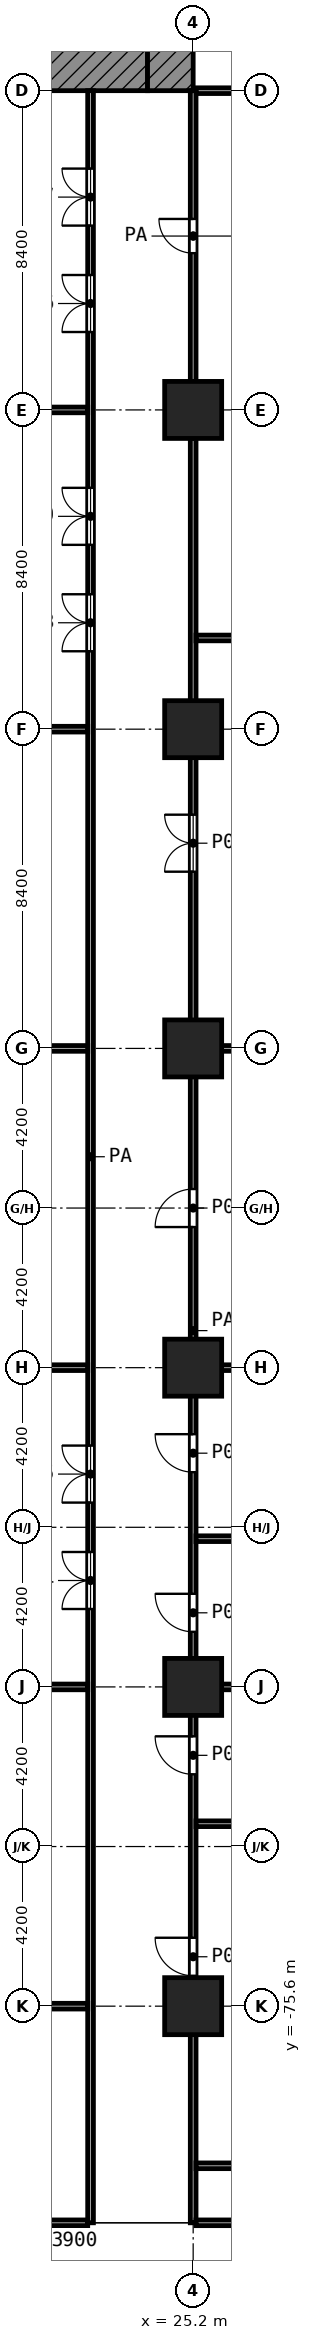
"""IFC4 building model, lengths in metres.
Left out: names, types, materials, properties, quantities, classifications, styles, units other than length and angle.
Written with IfcOpenShell. Run it as: python <this file> out.ifc"""

import sys

from ifc_helpers import new_model, si_unit, direction, frame, frame_2d, origin, origin_2d, place, context, subcontext, project, spatial, rectangle, extrude, element, fill, save


model = new_model("IFC4")
c1 = context("Model", 3, precision=1e-05, world=origin(), true_north=direction((0.0, 1.0)))
c2 = subcontext(c1, "Body", "Model", "MODEL_VIEW")
j1 = project(units=[si_unit("LENGTHUNIT", "METRE"), si_unit("PLANEANGLEUNIT", "RADIAN")], contexts=[c1])
p1 = place(None, origin())
s1 = spatial("IfcSite", under=j1, at=p1, CompositionType="ELEMENT")
p2 = place(p1, origin())
s2 = spatial("IfcBuilding", under=s1, at=p2, CompositionType="ELEMENT")
p3 = place(p2, frame((0.0, 0.0, 7.0)))
s3 = spatial("IfcBuildingStorey", under=s2, at=p3, CompositionType="ELEMENT", Elevation=7.0)
for number, where, z_axis, x_axis in (
    (1, (25.2, -33.6, 0.0), (0.0, 0.0, 1.0), (1.0, 0.0, 0.0)),
    (2, (25.2, -42.0, 0.0), (0.0, 0.0, 1.0), (1.0, 0.0, 0.0)),
    (3, (25.2, -50.4, 0.0), (0.0, 0.0, 1.0), (1.0, 0.0, 0.0)),
    (4, (25.2, -58.8, 0.0), (0.0, 0.0, 1.0), (1.0, 0.0, 0.0)),
    (5, (25.2, -67.2, 0.0), (0.0, 0.0, 1.0), (1.0, 0.0, 0.0)),
    (6, (25.2, -75.6, 0.0), (0.0, 0.0, 1.0), (1.0, 0.0, 0.0)),
):
    element("IfcColumn", number, at=place(p3, frame(where, z_axis=z_axis, x_axis=x_axis)), inside=s3, PredefinedType="COLUMN", context=c2, shape_type="SweptSolid", body=[
        extrude(rectangle(XDim=1.5, YDim=1.5, at=origin_2d()), origin(), (0.0, 0.0, 1.0), 5.6),
    ])
p4 = place(p3, frame((5.4, -24.6, 0.0), z_axis=(0.0, 0.0, 1.0), x_axis=(1.0, 0.0, 0.0)))
e7 = element("IfcWall", 7, at=p4, inside=s3, PredefinedType="SHEAR", context=c2, shape_type="SweptSolid", body=[
    extrude(rectangle(XDim=18.6, YDim=1.2, at=frame_2d((9.3, 0.0))), origin(), (0.0, 0.0, 1.0), 5.25),
])
p5 = place(p4, frame((6.3, 0.0, 0.0)))
e8 = element("IfcOpeningElement", 8, at=p5, cuts=e7, PredefinedType="OPENING", context=c2, shape_type="SweptSolid", body=[
    extrude(rectangle(XDim=1.8, YDim=2.1, at=frame_2d((0.9, 1.05))), frame((0.0, 0.61, 0.0), z_axis=(0.0, -1.0, 0.0), x_axis=(1.0, 0.0, 0.0)), (0.0, 0.0, 1.0), 1.22),
])
p6 = place(p3, frame((24.6, -25.2, 0.0), z_axis=(0.0, 0.0, 1.0), x_axis=(0.0, 1.0, 0.0)))
e9 = element("IfcWall", 9, at=p6, inside=s3, PredefinedType="SHEAR", context=c2, shape_type="SweptSolid", body=[
    extrude(rectangle(XDim=1.2, YDim=1.2, at=frame_2d((0.6, 0.0))), origin(), (0.0, 0.0, 1.0), 5.25),
])
p7 = place(p3, frame((11.175, -81.3, 0.0), z_axis=(0.0, 0.0, 1.0), x_axis=(1.0, 0.0, 0.0)))
e10 = element("IfcWall", 10, at=p7, inside=s3, PredefinedType="PARTITIONING", context=c2, shape_type="SweptSolid", body=[
    extrude(rectangle(XDim=11.25, YDim=0.15, at=frame_2d((5.625, 0.0))), origin(), (0.0, 0.0, 1.0), 5.25),
])
p8 = place(p7, frame((5.125, 0.0, 0.0)))
e11 = element("IfcOpeningElement", 11, at=p8, cuts=e10, PredefinedType="OPENING", context=c2, shape_type="SweptSolid", body=[
    extrude(rectangle(XDim=1.0, YDim=2.1, at=frame_2d((0.5, 1.05))), frame((0.0, 0.085, 0.0), z_axis=(0.0, -1.0, 0.0), x_axis=(1.0, 0.0, 0.0)), (0.0, 0.0, 1.0), 0.17),
])
p9 = place(p3, frame((25.275, -81.3, 0.0), z_axis=(0.0, 0.0, 1.0), x_axis=(1.0, 0.0, 0.0)))
e12 = element("IfcWall", 12, at=p9, inside=s3, PredefinedType="PARTITIONING", context=c2, shape_type="SweptSolid", body=[
    extrude(rectangle(XDim=3.15, YDim=0.15, at=frame_2d((1.575, 0.0))), origin(), (0.0, 0.0, 1.0), 5.25),
])
p10 = place(p3, frame((25.275, -79.8, 0.0), z_axis=(0.0, 0.0, 1.0), x_axis=(1.0, 0.0, 0.0)))
e13 = element("IfcWall", 13, at=p10, inside=s3, PredefinedType="PARTITIONING", context=c2, shape_type="SweptSolid", body=[
    extrude(rectangle(XDim=7.612, YDim=0.15, at=frame_2d((3.806, 0.0))), origin(), (0.0, 0.0, 1.0), 3.85),
])
p11 = place(p3, frame((11.175, -75.6, 0.0), z_axis=(0.0, 0.0, 1.0), x_axis=(1.0, 0.0, 0.0)))
e14 = element("IfcWall", 14, at=p11, inside=s3, PredefinedType="PARTITIONING", context=c2, shape_type="SweptSolid", body=[
    extrude(rectangle(XDim=11.25, YDim=0.15, at=frame_2d((5.625, 0.0))), origin(), (0.0, 0.0, 1.0), 5.25),
])
p12 = place(p3, frame((25.275, -70.8, 0.0), z_axis=(0.0, 0.0, 1.0), x_axis=(1.0, 0.0, 0.0)))
e15 = element("IfcWall", 15, at=p12, inside=s3, PredefinedType="PARTITIONING", context=c2, shape_type="SweptSolid", body=[
    extrude(rectangle(XDim=8.805, YDim=0.15, at=frame_2d((4.403, 0.0))), origin(), (0.0, 0.0, 1.0), 3.85),
])
p13 = place(p3, frame((11.175, -67.2, 0.0), z_axis=(0.0, 0.0, 1.0), x_axis=(1.0, 0.0, 0.0)))
e16 = element("IfcWall", 16, at=p13, inside=s3, PredefinedType="PARTITIONING", context=c2, shape_type="SweptSolid", body=[
    extrude(rectangle(XDim=11.25, YDim=0.15, at=frame_2d((5.625, 0.0))), origin(), (0.0, 0.0, 1.0), 5.25),
])
p14 = place(p3, frame((25.275, -67.2, 0.0), z_axis=(0.0, 0.0, 1.0), x_axis=(1.0, 0.0, 0.0)))
e17 = element("IfcWall", 17, at=p14, inside=s3, PredefinedType="PARTITIONING", context=c2, shape_type="SweptSolid", body=[
    extrude(rectangle(XDim=8.805, YDim=0.15, at=frame_2d((4.403, 0.0))), origin(), (0.0, 0.0, 1.0), 4.35),
])
p15 = place(p3, frame((25.275, -63.3, 0.0), z_axis=(0.0, 0.0, 1.0), x_axis=(1.0, 0.0, 0.0)))
e18 = element("IfcWall", 18, at=p15, inside=s3, PredefinedType="PARTITIONING", context=c2, shape_type="SweptSolid", body=[
    extrude(rectangle(XDim=8.805, YDim=0.15, at=frame_2d((4.403, 0.0))), origin(), (0.0, 0.0, 1.0), 3.85),
])
p16 = place(p3, frame((11.175, -58.8, 0.0), z_axis=(0.0, 0.0, 1.0), x_axis=(1.0, 0.0, 0.0)))
e19 = element("IfcWall", 19, at=p16, inside=s3, PredefinedType="PARTITIONING", context=c2, shape_type="SweptSolid", body=[
    extrude(rectangle(XDim=11.25, YDim=0.15, at=frame_2d((5.625, 0.0))), origin(), (0.0, 0.0, 1.0), 5.25),
])
p17 = place(p3, frame((25.275, -58.8, 0.0), z_axis=(0.0, 0.0, 1.0), x_axis=(1.0, 0.0, 0.0)))
e20 = element("IfcWall", 20, at=p17, inside=s3, PredefinedType="PARTITIONING", context=c2, shape_type="SweptSolid", body=[
    extrude(rectangle(XDim=8.805, YDim=0.15, at=frame_2d((4.403, 0.0))), origin(), (0.0, 0.0, 1.0), 4.35),
])
p18 = place(p3, frame((11.175, -50.4, 0.0), z_axis=(0.0, 0.0, 1.0), x_axis=(1.0, 0.0, 0.0)))
e21 = element("IfcWall", 21, at=p18, inside=s3, PredefinedType="PARTITIONING", context=c2, shape_type="SweptSolid", body=[
    extrude(rectangle(XDim=11.25, YDim=0.15, at=frame_2d((5.625, 0.0))), origin(), (0.0, 0.0, 1.0), 5.25),
])
p19 = place(p3, frame((25.275, -50.4, 0.0), z_axis=(0.0, 0.0, 1.0), x_axis=(1.0, 0.0, 0.0)))
e22 = element("IfcWall", 22, at=p19, inside=s3, PredefinedType="PARTITIONING", context=c2, shape_type="SweptSolid", body=[
    extrude(rectangle(XDim=8.805, YDim=0.15, at=frame_2d((4.403, 0.0))), origin(), (0.0, 0.0, 1.0), 4.35),
])
p20 = place(p3, frame((11.175, -42.0, 0.0), z_axis=(0.0, 0.0, 1.0), x_axis=(1.0, 0.0, 0.0)))
e23 = element("IfcWall", 23, at=p20, inside=s3, PredefinedType="PARTITIONING", context=c2, shape_type="SweptSolid", body=[
    extrude(rectangle(XDim=11.25, YDim=0.15, at=frame_2d((5.625, 0.0))), origin(), (0.0, 0.0, 1.0), 5.25),
])
p21 = place(p3, frame((25.275, -39.6, 0.0), z_axis=(0.0, 0.0, 1.0), x_axis=(1.0, 0.0, 0.0)))
e24 = element("IfcWall", 24, at=p21, inside=s3, PredefinedType="PARTITIONING", context=c2, shape_type="SweptSolid", body=[
    extrude(rectangle(XDim=9.412, YDim=0.15, at=frame_2d((4.706, 0.0))), origin(), (0.0, 0.0, 1.0), 5.25),
])
p22 = place(p3, frame((11.175, -33.6, 0.0), z_axis=(0.0, 0.0, 1.0), x_axis=(1.0, 0.0, 0.0)))
e25 = element("IfcWall", 25, at=p22, inside=s3, PredefinedType="PARTITIONING", context=c2, shape_type="SweptSolid", body=[
    extrude(rectangle(XDim=11.25, YDim=0.15, at=frame_2d((5.625, 0.0))), origin(), (0.0, 0.0, 1.0), 5.25),
])
p23 = place(p3, frame((25.275, -25.2, 0.0), z_axis=(0.0, 0.0, 1.0), x_axis=(1.0, 0.0, 0.0)))
e26 = element("IfcWall", 26, at=p23, inside=s3, PredefinedType="PARTITIONING", context=c2, shape_type="SweptSolid", body=[
    extrude(rectangle(XDim=32.325, YDim=0.15, at=frame_2d((16.163, 0.0))), origin(), (0.0, 0.0, 1.0), 5.25),
])
p24 = place(p23, frame((18.625, 0.0, 0.0)))
e27 = element("IfcOpeningElement", 27, at=p24, cuts=e26, PredefinedType="OPENING", context=c2, shape_type="SweptSolid", body=[
    extrude(rectangle(XDim=1.0, YDim=2.1, at=frame_2d((0.5, 1.05))), frame((0.0, 0.085, 0.0), z_axis=(0.0, -1.0, 0.0), x_axis=(1.0, 0.0, 0.0)), (0.0, 0.0, 1.0), 0.17),
])
p25 = place(p23, frame((22.825, 0.0, 0.0)))
e28 = element("IfcOpeningElement", 28, at=p25, cuts=e26, PredefinedType="OPENING", context=c2, shape_type="SweptSolid", body=[
    extrude(rectangle(XDim=1.0, YDim=2.1, at=frame_2d((0.5, 1.05))), frame((0.0, 0.085, 0.0), z_axis=(0.0, -1.0, 0.0), x_axis=(1.0, 0.0, 0.0)), (0.0, 0.0, 1.0), 0.17),
])
p26 = place(p23, frame((26.575, 0.0, 0.0)))
e29 = element("IfcOpeningElement", 29, at=p26, cuts=e26, PredefinedType="OPENING", context=c2, shape_type="SweptSolid", body=[
    extrude(rectangle(XDim=1.0, YDim=2.1, at=frame_2d((0.5, 1.05))), frame((0.0, 0.085, 0.0), z_axis=(0.0, -1.0, 0.0), x_axis=(1.0, 0.0, 0.0)), (0.0, 0.0, 1.0), 0.17),
])
p27 = place(p23, frame((30.175, 0.0, 0.0)))
e30 = element("IfcOpeningElement", 30, at=p27, cuts=e26, PredefinedType="OPENING", context=c2, shape_type="SweptSolid", body=[
    extrude(rectangle(XDim=1.0, YDim=2.1, at=frame_2d((0.5, 1.05))), frame((0.0, 0.085, 0.0), z_axis=(0.0, -1.0, 0.0), x_axis=(1.0, 0.0, 0.0)), (0.0, 0.0, 1.0), 0.17),
])
p28 = place(p23, frame((9.125, 0.0, 0.0)))
e31 = element("IfcOpeningElement", 31, at=p28, cuts=e26, PredefinedType="OPENING", context=c2, shape_type="SweptSolid", body=[
    extrude(rectangle(XDim=1.5, YDim=2.1, at=frame_2d((0.75, 1.05))), frame((0.0, 0.085, 0.0), z_axis=(0.0, -1.0, 0.0), x_axis=(1.0, 0.0, 0.0)), (0.0, 0.0, 1.0), 0.17),
])
p29 = place(p3, frame((22.5, -81.3, 0.0), z_axis=(0.0, 0.0, 1.0), x_axis=(0.0, 1.0, 0.0)))
e32 = element("IfcWall", 32, at=p29, inside=s3, PredefinedType="PARTITIONING", context=c2, shape_type="SweptSolid", body=[
    extrude(rectangle(XDim=56.1, YDim=0.15, at=frame_2d((28.05, 0.0))), origin(), (0.0, 0.0, 1.0), 5.25),
])
p30 = place(p29, frame((49.75, 0.0, 0.0)))
e33 = element("IfcOpeningElement", 33, at=p30, cuts=e32, PredefinedType="OPENING", context=c2, shape_type="SweptSolid", body=[
    extrude(rectangle(XDim=1.5, YDim=2.1, at=frame_2d((0.75, 1.05))), frame((0.0, 0.085, 0.0), z_axis=(0.0, -1.0, 0.0), x_axis=(1.0, 0.0, 0.0)), (0.0, 0.0, 1.0), 0.17),
])
p31 = place(p29, frame((52.55, 0.0, 0.0)))
e34 = element("IfcOpeningElement", 34, at=p31, cuts=e32, PredefinedType="OPENING", context=c2, shape_type="SweptSolid", body=[
    extrude(rectangle(XDim=1.5, YDim=2.1, at=frame_2d((0.75, 1.05))), frame((0.0, 0.085, 0.0), z_axis=(0.0, -1.0, 0.0), x_axis=(1.0, 0.0, 0.0)), (0.0, 0.0, 1.0), 0.17),
])
p32 = place(p29, frame((41.35, 0.0, 0.0)))
e35 = element("IfcOpeningElement", 35, at=p32, cuts=e32, PredefinedType="OPENING", context=c2, shape_type="SweptSolid", body=[
    extrude(rectangle(XDim=1.5, YDim=2.1, at=frame_2d((0.75, 1.05))), frame((0.0, 0.085, 0.0), z_axis=(0.0, -1.0, 0.0), x_axis=(1.0, 0.0, 0.0)), (0.0, 0.0, 1.0), 0.17),
])
p33 = place(p29, frame((44.15, 0.0, 0.0)))
e36 = element("IfcOpeningElement", 36, at=p33, cuts=e32, PredefinedType="OPENING", context=c2, shape_type="SweptSolid", body=[
    extrude(rectangle(XDim=1.5, YDim=2.1, at=frame_2d((0.75, 1.05))), frame((0.0, 0.085, 0.0), z_axis=(0.0, -1.0, 0.0), x_axis=(1.0, 0.0, 0.0)), (0.0, 0.0, 1.0), 0.17),
])
p34 = place(p29, frame((16.15, 0.0, 0.0)))
e37 = element("IfcOpeningElement", 37, at=p34, cuts=e32, PredefinedType="OPENING", context=c2, shape_type="SweptSolid", body=[
    extrude(rectangle(XDim=1.5, YDim=2.1, at=frame_2d((0.75, 1.05))), frame((0.0, 0.085, 0.0), z_axis=(0.0, -1.0, 0.0), x_axis=(1.0, 0.0, 0.0)), (0.0, 0.0, 1.0), 0.17),
])
p35 = place(p29, frame((18.95, 0.0, 0.0)))
e38 = element("IfcOpeningElement", 38, at=p35, cuts=e32, PredefinedType="OPENING", context=c2, shape_type="SweptSolid", body=[
    extrude(rectangle(XDim=1.5, YDim=2.1, at=frame_2d((0.75, 1.05))), frame((0.0, 0.085, 0.0), z_axis=(0.0, -1.0, 0.0), x_axis=(1.0, 0.0, 0.0)), (0.0, 0.0, 1.0), 0.17),
])
p36 = place(p3, frame((25.2, -81.3, 0.0), z_axis=(0.0, 0.0, 1.0), x_axis=(0.0, 1.0, 0.0)))
e39 = element("IfcWall", 39, at=p36, inside=s3, PredefinedType="PARTITIONING", context=c2, shape_type="SweptSolid", body=[
    extrude(rectangle(XDim=46.95, YDim=0.15, at=frame_2d((23.475, 0.0))), origin(), (0.0, 0.0, 1.0), 5.25),
])
p37 = place(p36, frame((35.55, 0.0, 0.0)))
e40 = element("IfcOpeningElement", 40, at=p37, cuts=e39, PredefinedType="OPENING", context=c2, shape_type="SweptSolid", body=[
    extrude(rectangle(XDim=1.5, YDim=2.1, at=frame_2d((0.75, 1.05))), frame((0.0, 0.085, 0.0), z_axis=(0.0, -1.0, 0.0), x_axis=(1.0, 0.0, 0.0)), (0.0, 0.0, 1.0), 0.17),
])
p38 = place(p36, frame((26.2, 0.0, 0.0)))
e41 = element("IfcOpeningElement", 41, at=p38, cuts=e39, PredefinedType="OPENING", context=c2, shape_type="SweptSolid", body=[
    extrude(rectangle(XDim=1.0, YDim=2.1, at=frame_2d((0.5, 1.05))), frame((0.0, 0.085, 0.0), z_axis=(0.0, -1.0, 0.0), x_axis=(1.0, 0.0, 0.0)), (0.0, 0.0, 1.0), 0.17),
])
p39 = place(p36, frame((19.75, 0.0, 0.0)))
e42 = element("IfcOpeningElement", 42, at=p39, cuts=e39, PredefinedType="OPENING", context=c2, shape_type="SweptSolid", body=[
    extrude(rectangle(XDim=1.0, YDim=2.1, at=frame_2d((0.5, 1.05))), frame((0.0, 0.085, 0.0), z_axis=(0.0, -1.0, 0.0), x_axis=(1.0, 0.0, 0.0)), (0.0, 0.0, 1.0), 0.17),
])
p40 = place(p36, frame((15.55, 0.0, 0.0)))
e43 = element("IfcOpeningElement", 43, at=p40, cuts=e39, PredefinedType="OPENING", context=c2, shape_type="SweptSolid", body=[
    extrude(rectangle(XDim=1.0, YDim=2.1, at=frame_2d((0.5, 1.05))), frame((0.0, 0.085, 0.0), z_axis=(0.0, -1.0, 0.0), x_axis=(1.0, 0.0, 0.0)), (0.0, 0.0, 1.0), 0.17),
])
p41 = place(p36, frame((11.8, 0.0, 0.0)))
e44 = element("IfcOpeningElement", 44, at=p41, cuts=e39, PredefinedType="OPENING", context=c2, shape_type="SweptSolid", body=[
    extrude(rectangle(XDim=1.0, YDim=2.1, at=frame_2d((0.5, 1.05))), frame((0.0, 0.085, 0.0), z_axis=(0.0, -1.0, 0.0), x_axis=(1.0, 0.0, 0.0)), (0.0, 0.0, 1.0), 0.17),
])
p42 = place(p36, frame((6.5, 0.0, 0.0)))
e45 = element("IfcOpeningElement", 45, at=p42, cuts=e39, PredefinedType="OPENING", context=c2, shape_type="SweptSolid", body=[
    extrude(rectangle(XDim=1.0, YDim=2.1, at=frame_2d((0.5, 1.05))), frame((0.0, 0.085, 0.0), z_axis=(0.0, -1.0, 0.0), x_axis=(1.0, 0.0, 0.0)), (0.0, 0.0, 1.0), 0.17),
])
p43 = place(p3, frame((25.2, -32.85, 0.0), z_axis=(0.0, 0.0, 1.0), x_axis=(0.0, 1.0, 0.0)))
e46 = element("IfcWall", 46, at=p43, inside=s3, PredefinedType="PARTITIONING", context=c2, shape_type="SweptSolid", body=[
    extrude(rectangle(XDim=7.65, YDim=0.15, at=frame_2d((3.825, 0.0))), origin(), (0.0, 0.0, 1.0), 5.25),
])
p44 = place(p43, frame((3.375, 0.0, 0.0)))
e47 = element("IfcOpeningElement", 47, at=p44, cuts=e46, PredefinedType="OPENING", context=c2, shape_type="SweptSolid", body=[
    extrude(rectangle(XDim=0.9, YDim=2.1, at=frame_2d((0.45, 1.05))), frame((0.0, 0.085, 0.0), z_axis=(0.0, -1.0, 0.0), x_axis=(1.0, 0.0, 0.0)), (0.0, 0.0, 1.0), 0.17),
])
p45 = place(p30, origin())
e48 = element("IfcDoor", 48, at=p45, inside=s3, OperationType="DOUBLE_DOOR_SINGLE_SWING", PredefinedType="DOOR", context=c2, shape_type="SweptSolid", body=[
    extrude(rectangle(XDim=1.5, YDim=2.1, at=frame_2d((0.75, 1.05))), frame((0.0, 0.025, 0.0), z_axis=(0.0, -1.0, 0.0), x_axis=(1.0, 0.0, 0.0)), (0.0, 0.0, 1.0), 0.05),
])
fill(e33, e48)
p46 = place(p31, origin())
e49 = element("IfcDoor", 49, at=p46, inside=s3, OperationType="DOUBLE_DOOR_SINGLE_SWING", PredefinedType="DOOR", context=c2, shape_type="SweptSolid", body=[
    extrude(rectangle(XDim=1.5, YDim=2.1, at=frame_2d((0.75, 1.05))), frame((0.0, 0.025, 0.0), z_axis=(0.0, -1.0, 0.0), x_axis=(1.0, 0.0, 0.0)), (0.0, 0.0, 1.0), 0.05),
])
fill(e34, e49)
p47 = place(p32, origin())
e50 = element("IfcDoor", 50, at=p47, inside=s3, OperationType="DOUBLE_DOOR_SINGLE_SWING", PredefinedType="DOOR", context=c2, shape_type="SweptSolid", body=[
    extrude(rectangle(XDim=1.5, YDim=2.1, at=frame_2d((0.75, 1.05))), frame((0.0, 0.025, 0.0), z_axis=(0.0, -1.0, 0.0), x_axis=(1.0, 0.0, 0.0)), (0.0, 0.0, 1.0), 0.05),
])
fill(e35, e50)
p48 = place(p33, origin())
e51 = element("IfcDoor", 51, at=p48, inside=s3, OperationType="DOUBLE_DOOR_SINGLE_SWING", PredefinedType="DOOR", context=c2, shape_type="SweptSolid", body=[
    extrude(rectangle(XDim=1.5, YDim=2.1, at=frame_2d((0.75, 1.05))), frame((0.0, 0.025, 0.0), z_axis=(0.0, -1.0, 0.0), x_axis=(1.0, 0.0, 0.0)), (0.0, 0.0, 1.0), 0.05),
])
fill(e36, e51)
p49 = place(p34, origin())
e52 = element("IfcDoor", 52, at=p49, inside=s3, OperationType="DOUBLE_DOOR_SINGLE_SWING", PredefinedType="DOOR", context=c2, shape_type="SweptSolid", body=[
    extrude(rectangle(XDim=1.5, YDim=2.1, at=frame_2d((0.75, 1.05))), frame((0.0, 0.025, 0.0), z_axis=(0.0, -1.0, 0.0), x_axis=(1.0, 0.0, 0.0)), (0.0, 0.0, 1.0), 0.05),
])
fill(e37, e52)
p50 = place(p35, origin())
e53 = element("IfcDoor", 53, at=p50, inside=s3, OperationType="DOUBLE_DOOR_SINGLE_SWING", PredefinedType="DOOR", context=c2, shape_type="SweptSolid", body=[
    extrude(rectangle(XDim=1.5, YDim=2.1, at=frame_2d((0.75, 1.05))), frame((0.0, 0.025, 0.0), z_axis=(0.0, -1.0, 0.0), x_axis=(1.0, 0.0, 0.0)), (0.0, 0.0, 1.0), 0.05),
])
fill(e38, e53)
p51 = place(p37, origin())
e54 = element("IfcDoor", 54, at=p51, inside=s3, OperationType="DOUBLE_DOOR_SINGLE_SWING", PredefinedType="DOOR", context=c2, shape_type="SweptSolid", body=[
    extrude(rectangle(XDim=1.5, YDim=2.1, at=frame_2d((0.75, 1.05))), frame((0.0, 0.025, 0.0), z_axis=(0.0, -1.0, 0.0), x_axis=(1.0, 0.0, 0.0)), (0.0, 0.0, 1.0), 0.05),
])
fill(e40, e54)
p52 = place(p38, origin())
e55 = element("IfcDoor", 55, at=p52, inside=s3, OperationType="SINGLE_SWING_LEFT", PredefinedType="DOOR", context=c2, shape_type="SweptSolid", body=[
    extrude(rectangle(XDim=1.0, YDim=2.1, at=frame_2d((0.5, 1.05))), frame((0.0, 0.025, 0.0), z_axis=(0.0, -1.0, 0.0), x_axis=(1.0, 0.0, 0.0)), (0.0, 0.0, 1.0), 0.05),
])
fill(e41, e55)
p53 = place(p39, origin())
e56 = element("IfcDoor", 56, at=p53, inside=s3, OperationType="SINGLE_SWING_RIGHT", PredefinedType="DOOR", context=c2, shape_type="SweptSolid", body=[
    extrude(rectangle(XDim=1.0, YDim=2.1, at=frame_2d((0.5, 1.05))), frame((0.0, 0.025, 0.0), z_axis=(0.0, -1.0, 0.0), x_axis=(1.0, 0.0, 0.0)), (0.0, 0.0, 1.0), 0.05),
])
fill(e42, e56)
p54 = place(p40, origin())
e57 = element("IfcDoor", 57, at=p54, inside=s3, OperationType="SINGLE_SWING_RIGHT", PredefinedType="DOOR", context=c2, shape_type="SweptSolid", body=[
    extrude(rectangle(XDim=1.0, YDim=2.1, at=frame_2d((0.5, 1.05))), frame((0.0, 0.025, 0.0), z_axis=(0.0, -1.0, 0.0), x_axis=(1.0, 0.0, 0.0)), (0.0, 0.0, 1.0), 0.05),
])
fill(e43, e57)
p55 = place(p41, origin())
e58 = element("IfcDoor", 58, at=p55, inside=s3, OperationType="SINGLE_SWING_RIGHT", PredefinedType="DOOR", context=c2, shape_type="SweptSolid", body=[
    extrude(rectangle(XDim=1.0, YDim=2.1, at=frame_2d((0.5, 1.05))), frame((0.0, 0.025, 0.0), z_axis=(0.0, -1.0, 0.0), x_axis=(1.0, 0.0, 0.0)), (0.0, 0.0, 1.0), 0.05),
])
fill(e44, e58)
p56 = place(p42, origin())
e59 = element("IfcDoor", 59, at=p56, inside=s3, OperationType="SINGLE_SWING_RIGHT", PredefinedType="DOOR", context=c2, shape_type="SweptSolid", body=[
    extrude(rectangle(XDim=1.0, YDim=2.1, at=frame_2d((0.5, 1.05))), frame((0.0, 0.025, 0.0), z_axis=(0.0, -1.0, 0.0), x_axis=(1.0, 0.0, 0.0)), (0.0, 0.0, 1.0), 0.05),
])
fill(e45, e59)
p57 = place(p44, origin())
e60 = element("IfcDoor", 60, at=p57, inside=s3, OperationType="SINGLE_SWING_RIGHT", PredefinedType="DOOR", context=c2, shape_type="SweptSolid", body=[
    extrude(rectangle(XDim=0.9, YDim=2.1, at=frame_2d((0.45, 1.05))), frame((0.0, 0.025, 0.0), z_axis=(0.0, -1.0, 0.0), x_axis=(1.0, 0.0, 0.0)), (0.0, 0.0, 1.0), 0.05),
])
fill(e47, e60)
save(model, sys.argv[1])
